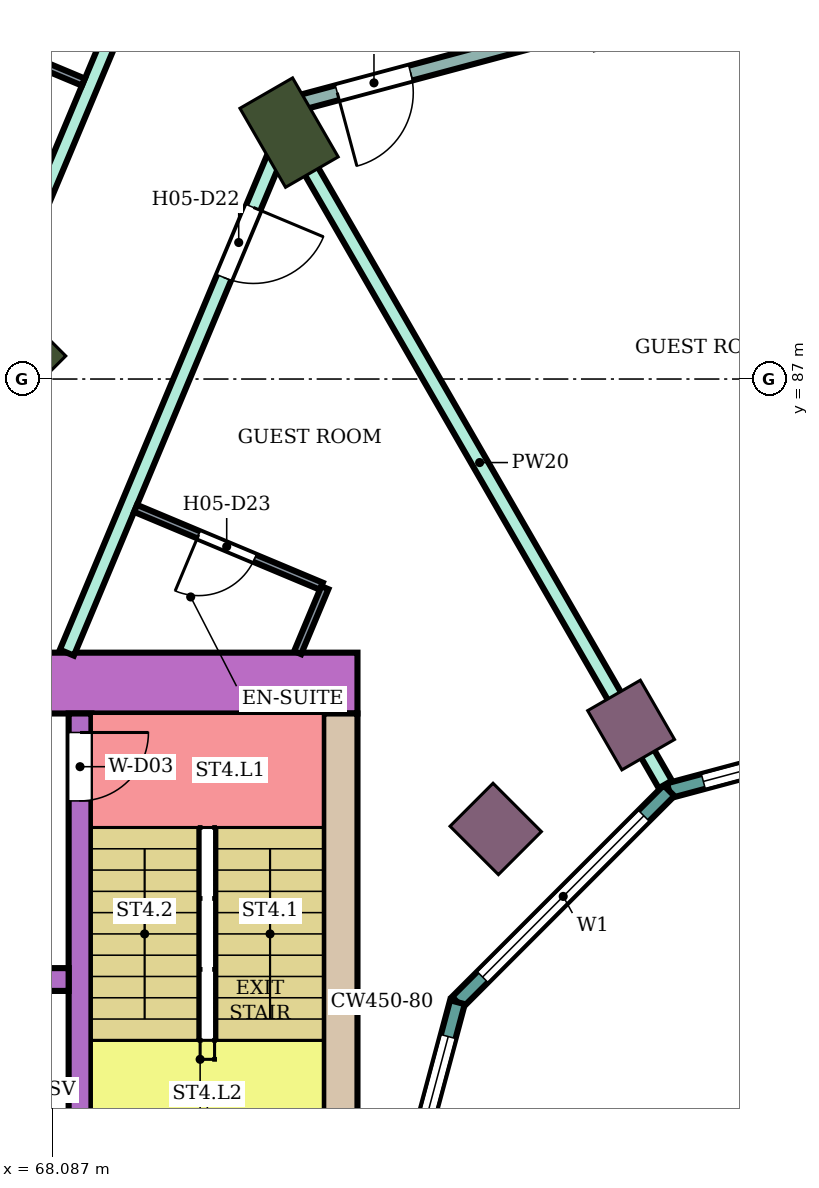
"""IFC4 building model, lengths in metres.
Left out: names, types, materials, properties, quantities, classifications, styles, units other than length and angle.
Written with IfcOpenShell. Run it as: python <this file> out.ifc"""

import sys

from ifc_helpers import new_model, si_unit, direction, frame, frame_2d, origin, origin_2d, place, context, subcontext, project, spatial, rectangle, extrude, element, fill, save


model = new_model("IFC4")
c1 = context("Model", 3, precision=1e-05, world=origin(), true_north=direction((0.0, 1.0)))
c2 = subcontext(c1, "Body", "Model", "MODEL_VIEW")
j1 = project(units=[si_unit("LENGTHUNIT", "METRE"), si_unit("PLANEANGLEUNIT", "RADIAN")], contexts=[c1])
p1 = place(None, origin())
s1 = spatial("IfcSite", under=j1, at=p1, CompositionType="ELEMENT")
p2 = place(p1, origin())
s2 = spatial("IfcBuilding", under=s1, at=p2, CompositionType="ELEMENT")
p3 = place(p2, frame((0.0, 0.0, 82.4)))
s3 = spatial("IfcBuildingStorey", under=s2, at=p3, CompositionType="ELEMENT", Elevation=82.4)
for number, where, z_axis, x_axis in (
    (1, (71.2, 90.242, 0.0), (0.0, 0.0, 1.0), (-0.5, 0.866, 0.0)),
    (2, (67.555, 87.445, 0.0), (0.0, 0.0, 1.0), (-0.707, 0.707, 0.0)),
):
    element("IfcColumn", number, at=place(p3, frame(where, z_axis=z_axis, x_axis=x_axis)), inside=s3, PredefinedType="COLUMN", context=c2, shape_type="SweptSolid", body=[
        extrude(rectangle(XDim=1.2, YDim=0.8, at=origin_2d()), origin(), (0.0, 0.0, 1.0), 3.8),
    ])
for number, where, z_axis, x_axis in (
    (3, (75.7, 82.448, 0.0), (0.0, 0.0, 1.0), (-0.5, 0.866, 0.0)),
    (4, (73.919, 81.081, 0.0), (0.0, 0.0, 1.0), (-0.707, 0.707, 0.0)),
):
    element("IfcColumn", number, at=place(p3, frame(where, z_axis=z_axis, x_axis=x_axis)), inside=s3, PredefinedType="COLUMN", context=c2, shape_type="SweptSolid", body=[
        extrude(rectangle(XDim=0.9, YDim=0.8, at=origin_2d()), origin(), (0.0, 0.0, 1.0), 3.8),
    ])
p4 = place(p3, frame((72.1, 83.0, 0.0), z_axis=(0.0, 0.0, 1.0), x_axis=(-1.0, 0.0, 0.0)))
e5 = element("IfcWall", 5, at=p4, inside=s3, PredefinedType="SHEAR", context=c2, shape_type="SweptSolid", body=[
    extrude(rectangle(XDim=14.7, YDim=0.8, at=frame_2d((7.35, 0.0))), origin(), (0.0, 0.0, 1.0), 3.48),
])
p5 = place(p4, frame((4.2, 0.0, 0.0)))
e6 = element("IfcOpeningElement", 6, at=p5, cuts=e5, PredefinedType="OPENING", context=c2, shape_type="SweptSolid", body=[
    extrude(rectangle(XDim=2.4, YDim=2.4, at=frame_2d((1.2, 1.2))), frame((0.0, 0.41, 0.0), z_axis=(0.0, -1.0, 0.0), x_axis=(1.0, 0.0, 0.0)), (0.0, 0.0, 1.0), 0.82),
])
p6 = place(p3, frame((71.875, 82.6, 0.0), z_axis=(0.0, 0.0, 1.0), x_axis=(0.0, -1.0, 0.0)))
e7 = element("IfcWall", 7, at=p6, inside=s3, PredefinedType="SHEAR", context=c2, shape_type="SweptSolid", body=[
    extrude(rectangle(XDim=7.6, YDim=0.45, at=frame_2d((3.8, 0.0))), origin(), (0.0, 0.0, 1.0), 3.48),
])
p7 = place(p3, frame((68.45, 82.6, 0.0), z_axis=(0.0, 0.0, 1.0), x_axis=(0.0, -1.0, 0.0)))
e8 = element("IfcWall", 8, at=p7, inside=s3, PredefinedType="SHEAR", context=c2, shape_type="SweptSolid", body=[
    extrude(rectangle(XDim=7.6, YDim=0.3, at=frame_2d((3.8, 0.0))), origin(), (0.0, 0.0, 1.0), 3.48),
])
p8 = place(p7, frame((0.25, 0.0, 0.0)))
e9 = element("IfcOpeningElement", 9, at=p8, cuts=e8, PredefinedType="OPENING", context=c2, shape_type="SweptSolid", body=[
    extrude(rectangle(XDim=0.9, YDim=2.1, at=frame_2d((0.45, 1.05))), frame((0.0, 0.16, 0.0), z_axis=(0.0, -1.0, 0.0), x_axis=(1.0, 0.0, 0.0)), (0.0, 0.0, 1.0), 0.32),
])
p9 = place(p3, frame((68.3, 79.1, 0.0), z_axis=(0.0, 0.0, 1.0), x_axis=(-1.0, 0.0, 0.0)))
e10 = element("IfcWall", 10, at=p9, inside=s3, PredefinedType="SHEAR", context=c2, shape_type="SweptSolid", body=[
    extrude(rectangle(XDim=10.9, YDim=0.3, at=frame_2d((5.45, 0.0))), origin(), (0.0, 0.0, 1.0), 3.48),
])
p10 = place(p9, frame((0.4, 0.0, 0.0)))
e11 = element("IfcOpeningElement", 11, at=p10, cuts=e10, PredefinedType="OPENING", context=c2, shape_type="SweptSolid", body=[
    extrude(rectangle(XDim=1.4, YDim=2.1, at=frame_2d((0.7, 1.05))), frame((0.0, 0.16, 0.0), z_axis=(0.0, -1.0, 0.0), x_axis=(1.0, 0.0, 0.0)), (0.0, 0.0, 1.0), 0.32),
])
p11 = place(p9, frame((5.4, 0.0, 0.0)))
e12 = element("IfcOpeningElement", 12, at=p11, cuts=e10, PredefinedType="OPENING", context=c2, shape_type="SweptSolid", body=[
    extrude(rectangle(XDim=1.4, YDim=2.1, at=frame_2d((0.7, 1.05))), frame((0.0, 0.16, 0.0), z_axis=(0.0, -1.0, 0.0), x_axis=(1.0, 0.0, 0.0)), (0.0, 0.0, 1.0), 0.32),
])
p12 = place(p9, frame((8.1, 0.0, 0.0)))
e13 = element("IfcOpeningElement", 13, at=p12, cuts=e10, PredefinedType="OPENING", context=c2, shape_type="SweptSolid", body=[
    extrude(rectangle(XDim=1.0, YDim=2.1, at=frame_2d((0.5, 1.05))), frame((0.0, 0.16, 0.0), z_axis=(0.0, -1.0, 0.0), x_axis=(1.0, 0.0, 0.0)), (0.0, 0.0, 1.0), 0.32),
])
p13 = place(p3, frame((80.0, 82.604, 0.0), z_axis=(0.0, 0.0, 1.0), x_axis=(-0.965933654434, -0.258789828301, 0.0)))
e14 = element("IfcWall", 14, at=p13, inside=s3, PredefinedType="NOTDEFINED", context=c2, shape_type="SweptSolid", body=[
    extrude(rectangle(XDim=3.936, YDim=0.2, at=frame_2d((1.968, 0.0))), origin(), (0.0, 0.0, 1.0), 3.8),
])
p14 = place(p13, frame((0.468, 0.0, 0.9)))
e15 = element("IfcOpeningElement", 15, at=p14, cuts=e14, PredefinedType="OPENING", context=c2, shape_type="SweptSolid", body=[
    extrude(rectangle(XDim=3.0, YDim=2.3, at=frame_2d((1.5, 1.15))), frame((0.0, 0.11, 0.0), z_axis=(0.0, -1.0, 0.0), x_axis=(1.0, 0.0, 0.0)), (0.0, 0.0, 1.0), 0.22),
])
p15 = place(p3, frame((76.198, 81.585, 0.0), z_axis=(0.0, 0.0, 1.0), x_axis=(-0.707106781187, -0.707106781187, 0.0)))
e16 = element("IfcWall", 16, at=p15, inside=s3, PredefinedType="NOTDEFINED", context=c2, shape_type="SweptSolid", body=[
    extrude(rectangle(XDim=3.936, YDim=0.2, at=frame_2d((1.968, 0.0))), origin(), (0.0, 0.0, 1.0), 3.8),
])
p16 = place(p15, frame((0.468, 0.0, 0.9)))
e17 = element("IfcOpeningElement", 17, at=p16, cuts=e16, PredefinedType="OPENING", context=c2, shape_type="SweptSolid", body=[
    extrude(rectangle(XDim=3.0, YDim=2.3, at=frame_2d((1.5, 1.15))), frame((0.0, 0.11, 0.0), z_axis=(0.0, -1.0, 0.0), x_axis=(1.0, 0.0, 0.0)), (0.0, 0.0, 1.0), 0.22),
])
p17 = place(p3, frame((73.415, 78.802, 0.0), z_axis=(0.0, 0.0, 1.0), x_axis=(-0.258789828301, -0.965933654434, 0.0)))
e18 = element("IfcWall", 18, at=p17, inside=s3, PredefinedType="NOTDEFINED", context=c2, shape_type="SweptSolid", body=[
    extrude(rectangle(XDim=3.936, YDim=0.2, at=frame_2d((1.968, 0.0))), origin(), (0.0, 0.0, 1.0), 3.8),
])
p18 = place(p17, frame((0.468, 0.0, 0.9)))
e19 = element("IfcOpeningElement", 19, at=p18, cuts=e18, PredefinedType="OPENING", context=c2, shape_type="SweptSolid", body=[
    extrude(rectangle(XDim=3.0, YDim=2.3, at=frame_2d((1.5, 1.15))), frame((0.0, 0.11, 0.0), z_axis=(0.0, -1.0, 0.0), x_axis=(1.0, 0.0, 0.0)), (0.0, 0.0, 1.0), 0.22),
])
p19 = place(p3, frame((66.085, 84.9, 0.0), z_axis=(0.0, 0.0, 1.0), x_axis=(0.386676248006, 0.922215527536, 0.0)))
e20 = element("IfcWall", 20, at=p19, inside=s3, PredefinedType="PARTITIONING", context=c2, shape_type="SweptSolid", body=[
    extrude(rectangle(XDim=8.5, YDim=0.2, at=frame_2d((4.25, 0.0))), origin(), (0.0, 0.0, 1.0), 3.35),
])
p20 = place(p19, frame((3.748, 0.0, 0.0)))
e21 = element("IfcOpeningElement", 21, at=p20, cuts=e20, PredefinedType="OPENING", context=c2, shape_type="SweptSolid", body=[
    extrude(rectangle(XDim=1.0, YDim=2.1, at=frame_2d((0.5, 1.05))), frame((0.0, 0.11, 0.0), z_axis=(0.0, -1.0, 0.0), x_axis=(1.0, 0.0, 0.0)), (0.0, 0.0, 1.0), 0.22),
])
p21 = place(p3, frame((68.277, 83.4, 0.0), z_axis=(0.0, 0.0, 1.0), x_axis=(0.386454861164, 0.922308321703, 0.0)))
e22 = element("IfcWall", 22, at=p21, inside=s3, PredefinedType="PARTITIONING", context=c2, shape_type="SweptSolid", body=[
    extrude(rectangle(XDim=7.762, YDim=0.2, at=frame_2d((3.881, 0.0))), origin(), (0.0, 0.0, 1.0), 3.35),
])
p22 = place(p21, frame((5.351, 0.0, 0.0)))
e23 = element("IfcOpeningElement", 23, at=p22, cuts=e22, PredefinedType="OPENING", context=c2, shape_type="SweptSolid", body=[
    extrude(rectangle(XDim=1.0, YDim=2.1, at=frame_2d((0.5, 1.05))), frame((0.0, 0.11, 0.0), z_axis=(0.0, -1.0, 0.0), x_axis=(1.0, 0.0, 0.0)), (0.0, 0.0, 1.0), 0.22),
])
p23 = place(p3, frame((71.264, 90.135, 0.0), z_axis=(0.0, 0.0, 1.0), x_axis=(0.499791624077, -0.866145676259, 0.0)))
e24 = element("IfcWall", 24, at=p23, inside=s3, PredefinedType="PARTITIONING", context=c2, shape_type="SweptSolid", body=[
    extrude(rectangle(XDim=9.778, YDim=0.2, at=frame_2d((4.889, 0.0))), origin(), (0.0, 0.0, 1.0), 3.35),
])
p24 = place(p3, frame((71.303, 90.625, 0.0), z_axis=(0.0, 0.0, 1.0), x_axis=(0.965971868307, 0.258647152776, 0.0)))
e25 = element("IfcWall", 25, at=p24, inside=s3, PredefinedType="PARTITIONING", context=c2, shape_type="SweptSolid", body=[
    extrude(rectangle(XDim=8.874, YDim=0.2, at=frame_2d((4.437, 0.0))), origin(), (0.0, 0.0, 1.0), 2.98),
])
p25 = place(p24, frame((0.55, 0.0, 0.0)))
e26 = element("IfcOpeningElement", 26, at=p25, cuts=e25, PredefinedType="OPENING", context=c2, shape_type="SweptSolid", body=[
    extrude(rectangle(XDim=1.0, YDim=2.1, at=frame_2d((0.5, 1.05))), frame((0.0, 0.11, 0.0), z_axis=(0.0, -1.0, 0.0), x_axis=(1.0, 0.0, 0.0)), (0.0, 0.0, 1.0), 0.22),
])
p26 = place(p3, frame((66.003, 91.95, 0.0), z_axis=(0.0, 0.0, 1.0), x_axis=(0.922350337209, -0.386354572188, 0.0)))
e27 = element("IfcWall", 27, at=p26, inside=s3, PredefinedType="PARTITIONING", context=c2, shape_type="SweptSolid", body=[
    extrude(rectangle(XDim=2.7, YDim=0.1, at=frame_2d((1.35, 0.0))), origin(), (0.0, 0.0, 1.0), 3.35),
])
p27 = place(p3, frame((69.181, 85.298, 0.0), z_axis=(0.0, 0.0, 1.0), x_axis=(0.922377635784, -0.38628939541, 0.0)))
e28 = element("IfcWall", 28, at=p27, inside=s3, PredefinedType="PARTITIONING", context=c2, shape_type="SweptSolid", body=[
    extrude(rectangle(XDim=2.65, YDim=0.1, at=frame_2d((1.325, 0.0))), origin(), (0.0, 0.0, 1.0), 3.35),
])
p28 = place(p27, frame((0.9, 0.0, 0.0)))
e29 = element("IfcOpeningElement", 29, at=p28, cuts=e28, PredefinedType="OPENING", context=c2, shape_type="SweptSolid", body=[
    extrude(rectangle(XDim=0.8, YDim=2.1, at=frame_2d((0.4, 1.05))), frame((0.0, 0.06, 0.0), z_axis=(0.0, -1.0, 0.0), x_axis=(1.0, 0.0, 0.0)), (0.0, 0.0, 1.0), 0.12),
])
p29 = place(p3, frame((71.313, 83.4, 0.0), z_axis=(0.0, 0.0, 1.0), x_axis=(0.386148512695, 0.922436624459, 0.0)))
e30 = element("IfcWall", 30, at=p29, inside=s3, PredefinedType="PARTITIONING", context=c2, shape_type="SweptSolid", body=[
    extrude(rectangle(XDim=0.927, YDim=0.1, at=frame_2d((0.463, 0.0))), origin(), (0.0, 0.0, 1.0), 3.35),
])
p30 = place(p14, origin())
e31 = element("IfcWindow", 31, at=p30, inside=s3, PartitioningType="SINGLE_PANEL", PredefinedType="WINDOW", context=c2, shape_type="SweptSolid", body=[
    extrude(rectangle(XDim=3.0, YDim=2.3, at=frame_2d((1.5, 1.15))), frame((0.0, 0.03, 0.0), z_axis=(0.0, -1.0, 0.0), x_axis=(1.0, 0.0, 0.0)), (0.0, 0.0, 1.0), 0.06),
])
fill(e15, e31)
p31 = place(p16, origin())
e32 = element("IfcWindow", 32, at=p31, inside=s3, PartitioningType="SINGLE_PANEL", PredefinedType="WINDOW", context=c2, shape_type="SweptSolid", body=[
    extrude(rectangle(XDim=3.0, YDim=2.3, at=frame_2d((1.5, 1.15))), frame((0.0, 0.03, 0.0), z_axis=(0.0, -1.0, 0.0), x_axis=(1.0, 0.0, 0.0)), (0.0, 0.0, 1.0), 0.06),
])
fill(e17, e32)
p32 = place(p18, origin())
e33 = element("IfcWindow", 33, at=p32, inside=s3, PartitioningType="SINGLE_PANEL", PredefinedType="WINDOW", context=c2, shape_type="SweptSolid", body=[
    extrude(rectangle(XDim=3.0, YDim=2.3, at=frame_2d((1.5, 1.15))), frame((0.0, 0.03, 0.0), z_axis=(0.0, -1.0, 0.0), x_axis=(1.0, 0.0, 0.0)), (0.0, 0.0, 1.0), 0.06),
])
fill(e19, e33)
p33 = place(p25, frame((1.0, 0.0, 0.0), z_axis=(0.0, 0.0, 1.0), x_axis=(-1.0, 0.0, 0.0)))
e34 = element("IfcDoor", 34, at=p33, inside=s3, OperationType="SINGLE_SWING_RIGHT", PredefinedType="DOOR", context=c2, shape_type="SweptSolid", body=[
    extrude(rectangle(XDim=1.0, YDim=2.1, at=frame_2d((0.5, 1.05))), frame((0.0, 0.025, 0.0), z_axis=(0.0, -1.0, 0.0), x_axis=(1.0, 0.0, 0.0)), (0.0, 0.0, 1.0), 0.05),
])
fill(e26, e34)
p34 = place(p22, frame((1.0, 0.0, 0.0), z_axis=(0.0, 0.0, 1.0), x_axis=(-1.0, 0.0, 0.0)))
e35 = element("IfcDoor", 35, at=p34, inside=s3, OperationType="SINGLE_SWING_LEFT", PredefinedType="DOOR", context=c2, shape_type="SweptSolid", body=[
    extrude(rectangle(XDim=1.0, YDim=2.1, at=frame_2d((0.5, 1.05))), frame((0.0, 0.025, 0.0), z_axis=(0.0, -1.0, 0.0), x_axis=(1.0, 0.0, 0.0)), (0.0, 0.0, 1.0), 0.05),
])
fill(e23, e35)
p35 = place(p28, frame((0.8, 0.0, 0.0), z_axis=(0.0, 0.0, 1.0), x_axis=(-1.0, 0.0, 0.0)))
e36 = element("IfcDoor", 36, at=p35, inside=s3, OperationType="SINGLE_SWING_RIGHT", PredefinedType="DOOR", context=c2, shape_type="SweptSolid", body=[
    extrude(rectangle(XDim=0.8, YDim=2.1, at=frame_2d((0.4, 1.05))), frame((0.0, 0.025, 0.0), z_axis=(0.0, -1.0, 0.0), x_axis=(1.0, 0.0, 0.0)), (0.0, 0.0, 1.0), 0.05),
])
fill(e29, e36)
p36 = place(p8, origin())
e37 = element("IfcDoor", 37, at=p36, inside=s3, OperationType="SINGLE_SWING_LEFT", PredefinedType="DOOR", context=c2, shape_type="SweptSolid", body=[
    extrude(rectangle(XDim=0.9, YDim=2.1, at=frame_2d((0.45, 1.05))), frame((0.0, 0.025, 0.0), z_axis=(0.0, -1.0, 0.0), x_axis=(1.0, 0.0, 0.0)), (0.0, 0.0, 1.0), 0.05),
])
fill(e9, e37)
save(model, sys.argv[1])
